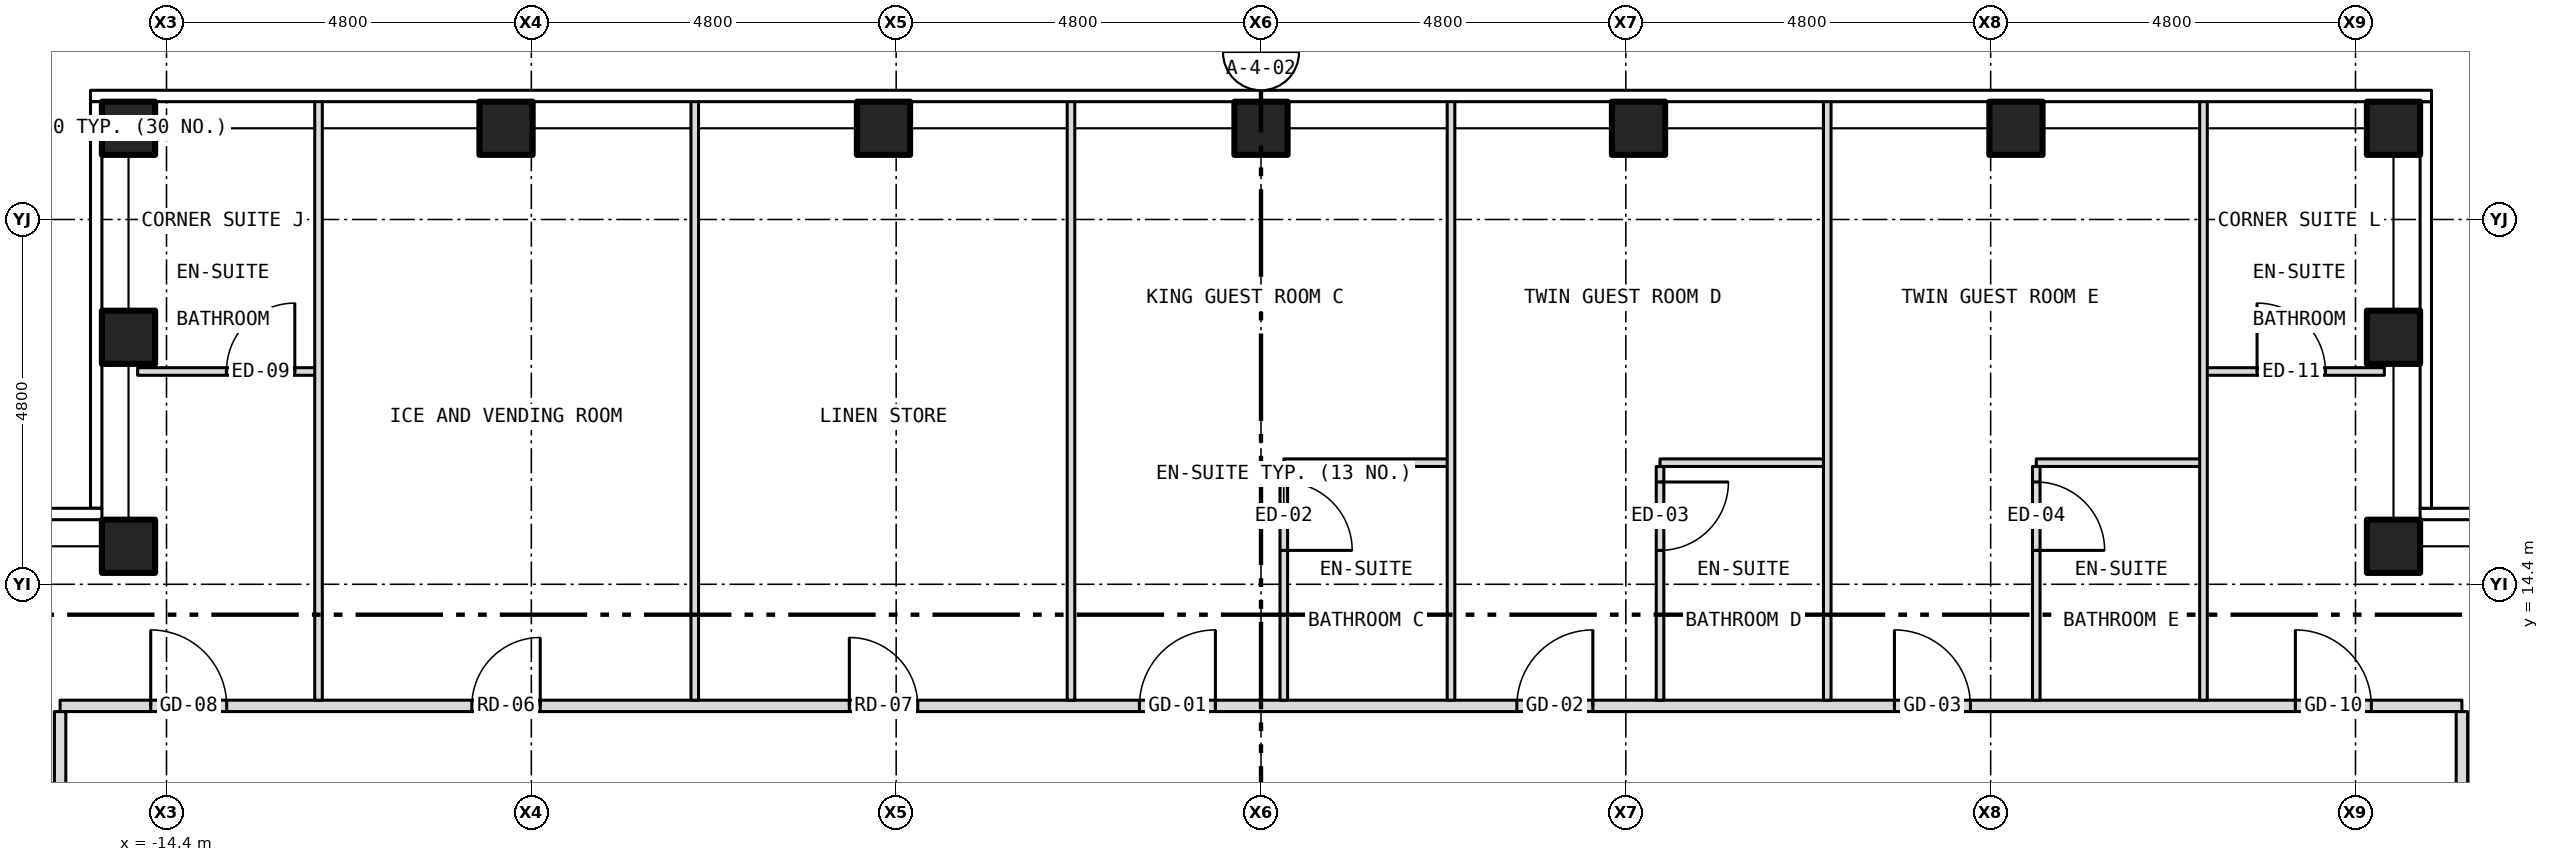
"""IFC4 building model, lengths in metres.
Left out: names, types, materials, properties, quantities, classifications, styles, units other than length and angle.
Written with IfcOpenShell. Run it as: python <this file> out.ifc"""

import sys

from ifc_helpers import new_model, si_unit, direction, frame, frame_2d, origin, origin_2d, place, context, subcontext, project, spatial, rectangle, hollow_rectangle, extrude, element, fill, save


model = new_model("IFC4")
c1 = context("Model", 3, precision=1e-05, world=origin(), true_north=direction((0.0, 1.0)))
c2 = subcontext(c1, "Body", "Model", "MODEL_VIEW")
j1 = project(units=[si_unit("LENGTHUNIT", "METRE"), si_unit("PLANEANGLEUNIT", "RADIAN")], contexts=[c1])
p1 = place(None, origin())
s1 = spatial("IfcSite", under=j1, at=p1, CompositionType="ELEMENT")
p2 = place(p1, origin())
s2 = spatial("IfcBuilding", under=s1, at=p2, CompositionType="ELEMENT")
p3 = place(p2, frame((0.0, 0.0, 208.5)))
s3 = spatial("IfcBuildingStorey", under=s2, at=p3, CompositionType="ELEMENT", Elevation=208.5)
for number, where, z_axis, x_axis in (
    (1, (-14.9, 20.4, -0.15), (0.0, 0.0, 1.0), (1.0, 0.0, 0.0)),
    (2, (-9.933, 20.4, -0.15), (0.0, 0.0, 1.0), (1.0, 0.0, 0.0)),
    (3, (-4.967, 20.4, -0.15), (0.0, 0.0, 1.0), (1.0, 0.0, 0.0)),
    (4, (0.0, 20.4, -0.15), (0.0, 0.0, 1.0), (1.0, 0.0, 0.0)),
    (5, (4.967, 20.4, -0.15), (0.0, 0.0, 1.0), (1.0, 0.0, 0.0)),
    (6, (9.933, 20.4, -0.15), (0.0, 0.0, 1.0), (1.0, 0.0, 0.0)),
    (7, (14.9, 20.4, -0.15), (0.0, 0.0, 1.0), (1.0, 0.0, 0.0)),
    (8, (-14.9, 14.9, -0.15), (0.0, 0.0, 1.0), (1.0, 0.0, 0.0)),
    (9, (-14.9, 17.65, -0.15), (0.0, 0.0, 1.0), (1.0, 0.0, 0.0)),
    (10, (14.9, 14.9, -0.15), (0.0, 0.0, 1.0), (1.0, 0.0, 0.0)),
    (11, (14.9, 17.65, -0.15), (0.0, 0.0, 1.0), (1.0, 0.0, 0.0)),
):
    element("IfcColumn", number, at=place(p3, frame(where, z_axis=z_axis, x_axis=x_axis)), inside=s3, PredefinedType="COLUMN", context=c2, shape_type="SweptSolid", body=[
        extrude(hollow_rectangle(XDim=0.7, YDim=0.7, WallThickness=0.04, at=origin_2d()), origin(), (0.0, 0.0, 1.0), 3.5),
    ])
p4 = place(p3, frame((-15.8, 12.8, 0.0), z_axis=(0.0, 0.0, 1.0), x_axis=(1.0, 0.0, 0.0)))
e12 = element("IfcWall", 12, at=p4, inside=s3, PredefinedType="PARTITIONING", context=c2, shape_type="SweptSolid", body=[
    extrude(rectangle(XDim=31.6, YDim=0.15, at=frame_2d((15.8, 0.0))), origin(), (0.0, 0.0, 1.0), 3.35),
])
p5 = place(p4, frame((5.417, 0.0, 0.0)))
e13 = element("IfcOpeningElement", 13, at=p5, cuts=e12, PredefinedType="OPENING", context=c2, shape_type="SweptSolid", body=[
    extrude(rectangle(XDim=0.9, YDim=2.1, at=frame_2d((0.45, 1.05))), frame((0.0, 0.087, 0.0), z_axis=(0.0, -1.0, 0.0), x_axis=(1.0, 0.0, 0.0)), (0.0, 0.0, 1.0), 0.174),
])
p6 = place(p4, frame((10.384, 0.0, 0.0)))
e14 = element("IfcOpeningElement", 14, at=p6, cuts=e12, PredefinedType="OPENING", context=c2, shape_type="SweptSolid", body=[
    extrude(rectangle(XDim=0.9, YDim=2.1, at=frame_2d((0.45, 1.05))), frame((0.0, 0.087, 0.0), z_axis=(0.0, -1.0, 0.0), x_axis=(1.0, 0.0, 0.0)), (0.0, 0.0, 1.0), 0.174),
])
p7 = place(p4, frame((14.2, 0.0, 0.0)))
e15 = element("IfcOpeningElement", 15, at=p7, cuts=e12, PredefinedType="OPENING", context=c2, shape_type="SweptSolid", body=[
    extrude(rectangle(XDim=1.0, YDim=2.1, at=frame_2d((0.5, 1.05))), frame((0.0, 0.087, 0.0), z_axis=(0.0, -1.0, 0.0), x_axis=(1.0, 0.0, 0.0)), (0.0, 0.0, 1.0), 0.174),
])
p8 = place(p4, frame((19.166, 0.0, 0.0)))
e16 = element("IfcOpeningElement", 16, at=p8, cuts=e12, PredefinedType="OPENING", context=c2, shape_type="SweptSolid", body=[
    extrude(rectangle(XDim=1.0, YDim=2.1, at=frame_2d((0.5, 1.05))), frame((0.0, 0.087, 0.0), z_axis=(0.0, -1.0, 0.0), x_axis=(1.0, 0.0, 0.0)), (0.0, 0.0, 1.0), 0.174),
])
p9 = place(p4, frame((24.134, 0.0, 0.0)))
e17 = element("IfcOpeningElement", 17, at=p9, cuts=e12, PredefinedType="OPENING", context=c2, shape_type="SweptSolid", body=[
    extrude(rectangle(XDim=1.0, YDim=2.1, at=frame_2d((0.5, 1.05))), frame((0.0, 0.087, 0.0), z_axis=(0.0, -1.0, 0.0), x_axis=(1.0, 0.0, 0.0)), (0.0, 0.0, 1.0), 0.174),
])
p10 = place(p4, frame((1.192, 0.0, 0.0)))
e18 = element("IfcOpeningElement", 18, at=p10, cuts=e12, PredefinedType="OPENING", context=c2, shape_type="SweptSolid", body=[
    extrude(rectangle(XDim=1.0, YDim=2.1, at=frame_2d((0.5, 1.05))), frame((0.0, 0.087, 0.0), z_axis=(0.0, -1.0, 0.0), x_axis=(1.0, 0.0, 0.0)), (0.0, 0.0, 1.0), 0.174),
])
p11 = place(p4, frame((29.409, 0.0, 0.0)))
e19 = element("IfcOpeningElement", 19, at=p11, cuts=e12, PredefinedType="OPENING", context=c2, shape_type="SweptSolid", body=[
    extrude(rectangle(XDim=1.0, YDim=2.1, at=frame_2d((0.5, 1.05))), frame((0.0, 0.087, 0.0), z_axis=(0.0, -1.0, 0.0), x_axis=(1.0, 0.0, 0.0)), (0.0, 0.0, 1.0), 0.174),
])
for number, where, z_axis, x_axis in (
    (20, (0.3, 16.0, 0.0), (0.0, 0.0, 1.0), (1.0, 0.0, 0.0)),
    (21, (5.25, 16.0, 0.0), (0.0, 0.0, 1.0), (1.0, 0.0, 0.0)),
    (22, (10.2, 16.0, 0.0), (0.0, 0.0, 1.0), (1.0, 0.0, 0.0)),
):
    element("IfcWall", number, at=place(p3, frame(where, z_axis=z_axis, x_axis=x_axis)), inside=s3, PredefinedType="PARTITIONING", context=c2, shape_type="SweptSolid", body=[
        extrude(rectangle(XDim=2.2, YDim=0.1, at=frame_2d((1.1, 0.0))), origin(), (0.0, 0.0, 1.0), 3.35),
    ])
p12 = place(p3, frame((-14.78, 17.2, 0.0), z_axis=(0.0, 0.0, 1.0), x_axis=(1.0, 0.0, 0.0)))
e23 = element("IfcWall", 23, at=p12, inside=s3, PredefinedType="PARTITIONING", context=c2, shape_type="SweptSolid", body=[
    extrude(rectangle(XDim=2.38, YDim=0.1, at=frame_2d((1.19, 0.0))), origin(), (0.0, 0.0, 1.0), 3.35),
])
p13 = place(p12, frame((1.168, 0.0, 0.0)))
e24 = element("IfcOpeningElement", 24, at=p13, cuts=e23, PredefinedType="OPENING", context=c2, shape_type="SweptSolid", body=[
    extrude(rectangle(XDim=0.9, YDim=2.1, at=frame_2d((0.45, 1.05))), frame((0.0, 0.062, 0.0), z_axis=(0.0, -1.0, 0.0), x_axis=(1.0, 0.0, 0.0)), (0.0, 0.0, 1.0), 0.124),
])
p14 = place(p3, frame((12.4, 17.2, 0.0), z_axis=(0.0, 0.0, 1.0), x_axis=(1.0, 0.0, 0.0)))
e25 = element("IfcWall", 25, at=p14, inside=s3, PredefinedType="PARTITIONING", context=c2, shape_type="SweptSolid", body=[
    extrude(rectangle(XDim=2.38, YDim=0.1, at=frame_2d((1.19, 0.0))), origin(), (0.0, 0.0, 1.0), 3.35),
])
p15 = place(p14, frame((0.705, 0.0, 0.0)))
e26 = element("IfcOpeningElement", 26, at=p15, cuts=e25, PredefinedType="OPENING", context=c2, shape_type="SweptSolid", body=[
    extrude(rectangle(XDim=0.9, YDim=2.1, at=frame_2d((0.45, 1.05))), frame((0.0, 0.062, 0.0), z_axis=(0.0, -1.0, 0.0), x_axis=(1.0, 0.0, 0.0)), (0.0, 0.0, 1.0), 0.124),
])
p16 = place(p3, frame((-15.8, 10.92, 0.0), z_axis=(0.0, 0.0, 1.0), x_axis=(0.0, 1.0, 0.0)))
e27 = element("IfcWall", 27, at=p16, inside=s3, PredefinedType="PARTITIONING", context=c2, shape_type="SweptSolid", body=[
    extrude(rectangle(XDim=1.805, YDim=0.15, at=frame_2d((0.903, 0.0))), origin(), (0.0, 0.0, 1.0), 3.35),
])
for number, where, z_axis, x_axis in (
    (28, (-12.4, 12.875, 0.0), (0.0, 0.0, 1.0), (0.0, 1.0, 0.0)),
    (29, (-7.45, 12.875, 0.0), (0.0, 0.0, 1.0), (0.0, 1.0, 0.0)),
    (30, (-2.5, 12.875, 0.0), (0.0, 0.0, 1.0), (0.0, 1.0, 0.0)),
):
    element("IfcWall", number, at=place(p3, frame(where, z_axis=z_axis, x_axis=x_axis)), inside=s3, PredefinedType="PARTITIONING", context=c2, shape_type="SweptSolid", body=[
        extrude(rectangle(XDim=7.905, YDim=0.1, at=frame_2d((3.953, 0.0))), origin(), (0.0, 0.0, 1.0), 3.35),
    ])
p17 = place(p3, frame((0.3, 12.875, 0.0), z_axis=(0.0, 0.0, 1.0), x_axis=(0.0, 1.0, 0.0)))
e31 = element("IfcWall", 31, at=p17, inside=s3, PredefinedType="PARTITIONING", context=c2, shape_type="SweptSolid", body=[
    extrude(rectangle(XDim=3.075, YDim=0.1, at=frame_2d((1.538, 0.0))), origin(), (0.0, 0.0, 1.0), 3.35),
])
p18 = place(p17, frame((1.971, 0.0, 0.0)))
e32 = element("IfcOpeningElement", 32, at=p18, cuts=e31, PredefinedType="OPENING", context=c2, shape_type="SweptSolid", body=[
    extrude(rectangle(XDim=0.9, YDim=2.1, at=frame_2d((0.45, 1.05))), frame((0.0, 0.062, 0.0), z_axis=(0.0, -1.0, 0.0), x_axis=(1.0, 0.0, 0.0)), (0.0, 0.0, 1.0), 0.124),
])
p19 = place(p3, frame((2.5, 12.875, 0.0), z_axis=(0.0, 0.0, 1.0), x_axis=(0.0, 1.0, 0.0)))
e33 = element("IfcWall", 33, at=p19, inside=s3, PredefinedType="PARTITIONING", context=c2, shape_type="SweptSolid", body=[
    extrude(rectangle(XDim=7.905, YDim=0.1, at=frame_2d((3.953, 0.0))), origin(), (0.0, 0.0, 1.0), 3.35),
])
p20 = place(p3, frame((5.25, 12.875, 0.0), z_axis=(0.0, 0.0, 1.0), x_axis=(0.0, 1.0, 0.0)))
e34 = element("IfcWall", 34, at=p20, inside=s3, PredefinedType="PARTITIONING", context=c2, shape_type="SweptSolid", body=[
    extrude(rectangle(XDim=3.075, YDim=0.1, at=frame_2d((1.538, 0.0))), origin(), (0.0, 0.0, 1.0), 3.35),
])
p21 = place(p20, frame((1.971, 0.0, 0.0)))
e35 = element("IfcOpeningElement", 35, at=p21, cuts=e34, PredefinedType="OPENING", context=c2, shape_type="SweptSolid", body=[
    extrude(rectangle(XDim=0.9, YDim=2.1, at=frame_2d((0.45, 1.05))), frame((0.0, 0.062, 0.0), z_axis=(0.0, -1.0, 0.0), x_axis=(1.0, 0.0, 0.0)), (0.0, 0.0, 1.0), 0.124),
])
p22 = place(p3, frame((7.45, 12.875, 0.0), z_axis=(0.0, 0.0, 1.0), x_axis=(0.0, 1.0, 0.0)))
e36 = element("IfcWall", 36, at=p22, inside=s3, PredefinedType="PARTITIONING", context=c2, shape_type="SweptSolid", body=[
    extrude(rectangle(XDim=7.905, YDim=0.1, at=frame_2d((3.953, 0.0))), origin(), (0.0, 0.0, 1.0), 3.35),
])
p23 = place(p3, frame((10.2, 12.875, 0.0), z_axis=(0.0, 0.0, 1.0), x_axis=(0.0, 1.0, 0.0)))
e37 = element("IfcWall", 37, at=p23, inside=s3, PredefinedType="PARTITIONING", context=c2, shape_type="SweptSolid", body=[
    extrude(rectangle(XDim=3.075, YDim=0.1, at=frame_2d((1.538, 0.0))), origin(), (0.0, 0.0, 1.0), 3.35),
])
p24 = place(p23, frame((1.971, 0.0, 0.0)))
e38 = element("IfcOpeningElement", 38, at=p24, cuts=e37, PredefinedType="OPENING", context=c2, shape_type="SweptSolid", body=[
    extrude(rectangle(XDim=0.9, YDim=2.1, at=frame_2d((0.45, 1.05))), frame((0.0, 0.062, 0.0), z_axis=(0.0, -1.0, 0.0), x_axis=(1.0, 0.0, 0.0)), (0.0, 0.0, 1.0), 0.124),
])
p25 = place(p3, frame((12.4, 12.875, 0.0), z_axis=(0.0, 0.0, 1.0), x_axis=(0.0, 1.0, 0.0)))
e39 = element("IfcWall", 39, at=p25, inside=s3, PredefinedType="PARTITIONING", context=c2, shape_type="SweptSolid", body=[
    extrude(rectangle(XDim=7.905, YDim=0.1, at=frame_2d((3.953, 0.0))), origin(), (0.0, 0.0, 1.0), 3.35),
])
p26 = place(p3, frame((15.8, 10.92, 0.0), z_axis=(0.0, 0.0, 1.0), x_axis=(0.0, 1.0, 0.0)))
e40 = element("IfcWall", 40, at=p26, inside=s3, PredefinedType="PARTITIONING", context=c2, shape_type="SweptSolid", body=[
    extrude(rectangle(XDim=1.805, YDim=0.15, at=frame_2d((0.903, 0.0))), origin(), (0.0, 0.0, 1.0), 3.35),
])
p27 = place(p5, origin())
e41 = element("IfcDoor", 41, at=p27, inside=s3, OperationType="SINGLE_SWING_RIGHT", PredefinedType="DOOR", context=c2, shape_type="SweptSolid", body=[
    extrude(rectangle(XDim=0.9, YDim=2.1, at=frame_2d((0.45, 1.05))), frame((0.0, 0.025, 0.0), z_axis=(0.0, -1.0, 0.0), x_axis=(1.0, 0.0, 0.0)), (0.0, 0.0, 1.0), 0.05),
])
fill(e13, e41)
p28 = place(p6, origin())
e42 = element("IfcDoor", 42, at=p28, inside=s3, OperationType="SINGLE_SWING_LEFT", PredefinedType="DOOR", context=c2, shape_type="SweptSolid", body=[
    extrude(rectangle(XDim=0.9, YDim=2.1, at=frame_2d((0.45, 1.05))), frame((0.0, 0.025, 0.0), z_axis=(0.0, -1.0, 0.0), x_axis=(1.0, 0.0, 0.0)), (0.0, 0.0, 1.0), 0.05),
])
fill(e14, e42)
p29 = place(p7, origin())
e43 = element("IfcDoor", 43, at=p29, inside=s3, OperationType="SINGLE_SWING_RIGHT", PredefinedType="DOOR", context=c2, shape_type="SweptSolid", body=[
    extrude(rectangle(XDim=1.0, YDim=2.1, at=frame_2d((0.5, 1.05))), frame((0.0, 0.025, 0.0), z_axis=(0.0, -1.0, 0.0), x_axis=(1.0, 0.0, 0.0)), (0.0, 0.0, 1.0), 0.05),
])
fill(e15, e43)
p30 = place(p18, origin())
e44 = element("IfcDoor", 44, at=p30, inside=s3, OperationType="SINGLE_SWING_LEFT", PredefinedType="DOOR", context=c2, shape_type="SweptSolid", body=[
    extrude(rectangle(XDim=0.9, YDim=2.1, at=frame_2d((0.45, 1.05))), frame((0.0, 0.025, 0.0), z_axis=(0.0, -1.0, 0.0), x_axis=(1.0, 0.0, 0.0)), (0.0, 0.0, 1.0), 0.05),
])
fill(e32, e44)
p31 = place(p8, origin())
e45 = element("IfcDoor", 45, at=p31, inside=s3, OperationType="SINGLE_SWING_RIGHT", PredefinedType="DOOR", context=c2, shape_type="SweptSolid", body=[
    extrude(rectangle(XDim=1.0, YDim=2.1, at=frame_2d((0.5, 1.05))), frame((0.0, 0.025, 0.0), z_axis=(0.0, -1.0, 0.0), x_axis=(1.0, 0.0, 0.0)), (0.0, 0.0, 1.0), 0.05),
])
fill(e16, e45)
p32 = place(p21, origin())
e46 = element("IfcDoor", 46, at=p32, inside=s3, OperationType="SINGLE_SWING_RIGHT", PredefinedType="DOOR", context=c2, shape_type="SweptSolid", body=[
    extrude(rectangle(XDim=0.9, YDim=2.1, at=frame_2d((0.45, 1.05))), frame((0.0, 0.025, 0.0), z_axis=(0.0, -1.0, 0.0), x_axis=(1.0, 0.0, 0.0)), (0.0, 0.0, 1.0), 0.05),
])
fill(e35, e46)
p33 = place(p9, origin())
e47 = element("IfcDoor", 47, at=p33, inside=s3, OperationType="SINGLE_SWING_LEFT", PredefinedType="DOOR", context=c2, shape_type="SweptSolid", body=[
    extrude(rectangle(XDim=1.0, YDim=2.1, at=frame_2d((0.5, 1.05))), frame((0.0, 0.025, 0.0), z_axis=(0.0, -1.0, 0.0), x_axis=(1.0, 0.0, 0.0)), (0.0, 0.0, 1.0), 0.05),
])
fill(e17, e47)
p34 = place(p24, origin())
e48 = element("IfcDoor", 48, at=p34, inside=s3, OperationType="SINGLE_SWING_LEFT", PredefinedType="DOOR", context=c2, shape_type="SweptSolid", body=[
    extrude(rectangle(XDim=0.9, YDim=2.1, at=frame_2d((0.45, 1.05))), frame((0.0, 0.025, 0.0), z_axis=(0.0, -1.0, 0.0), x_axis=(1.0, 0.0, 0.0)), (0.0, 0.0, 1.0), 0.05),
])
fill(e38, e48)
p35 = place(p13, origin())
e49 = element("IfcDoor", 49, at=p35, inside=s3, OperationType="SINGLE_SWING_RIGHT", PredefinedType="DOOR", context=c2, shape_type="SweptSolid", body=[
    extrude(rectangle(XDim=0.9, YDim=2.1, at=frame_2d((0.45, 1.05))), frame((0.0, 0.025, 0.0), z_axis=(0.0, -1.0, 0.0), x_axis=(1.0, 0.0, 0.0)), (0.0, 0.0, 1.0), 0.05),
])
fill(e24, e49)
p36 = place(p10, origin())
e50 = element("IfcDoor", 50, at=p36, inside=s3, OperationType="SINGLE_SWING_LEFT", PredefinedType="DOOR", context=c2, shape_type="SweptSolid", body=[
    extrude(rectangle(XDim=1.0, YDim=2.1, at=frame_2d((0.5, 1.05))), frame((0.0, 0.025, 0.0), z_axis=(0.0, -1.0, 0.0), x_axis=(1.0, 0.0, 0.0)), (0.0, 0.0, 1.0), 0.05),
])
fill(e18, e50)
p37 = place(p15, origin())
e51 = element("IfcDoor", 51, at=p37, inside=s3, OperationType="SINGLE_SWING_LEFT", PredefinedType="DOOR", context=c2, shape_type="SweptSolid", body=[
    extrude(rectangle(XDim=0.9, YDim=2.1, at=frame_2d((0.45, 1.05))), frame((0.0, 0.025, 0.0), z_axis=(0.0, -1.0, 0.0), x_axis=(1.0, 0.0, 0.0)), (0.0, 0.0, 1.0), 0.05),
])
fill(e26, e51)
p38 = place(p11, origin())
e52 = element("IfcDoor", 52, at=p38, inside=s3, OperationType="SINGLE_SWING_LEFT", PredefinedType="DOOR", context=c2, shape_type="SweptSolid", body=[
    extrude(rectangle(XDim=1.0, YDim=2.1, at=frame_2d((0.5, 1.05))), frame((0.0, 0.025, 0.0), z_axis=(0.0, -1.0, 0.0), x_axis=(1.0, 0.0, 0.0)), (0.0, 0.0, 1.0), 0.05),
])
fill(e19, e52)
save(model, sys.argv[1])
